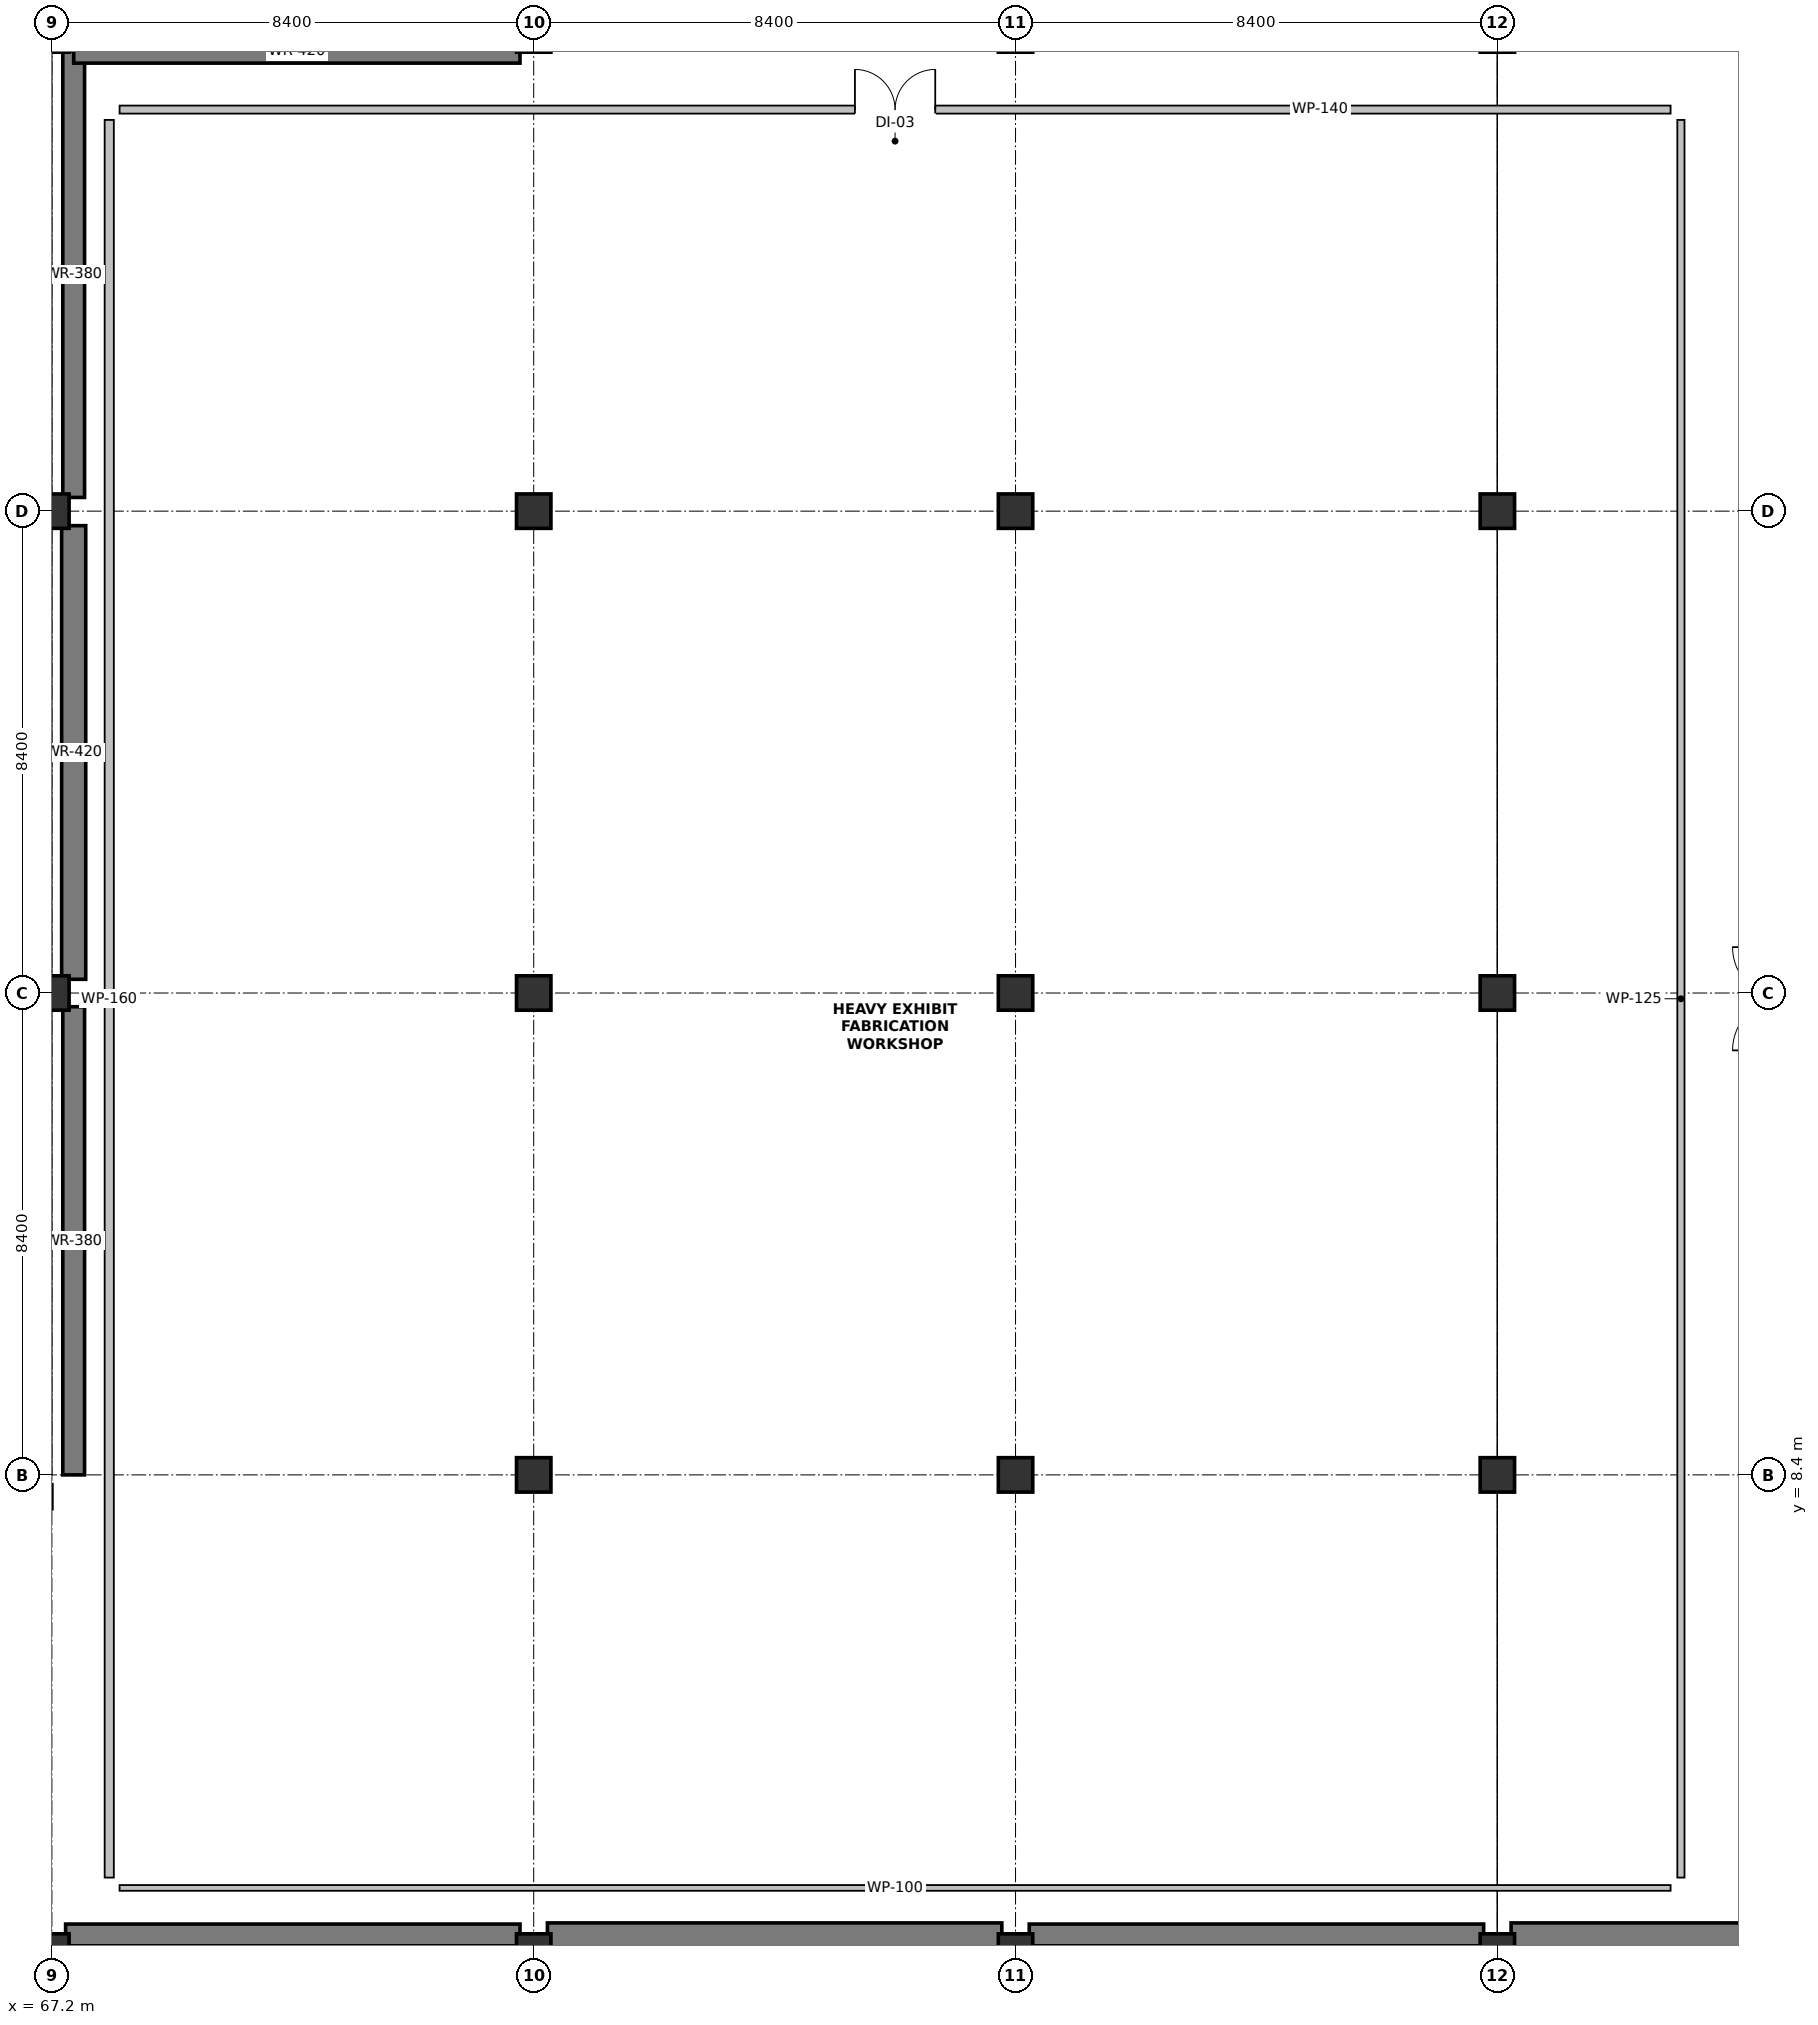
"""IFC4 building model, lengths in metres.
Left out: names, types, materials, properties, quantities, classifications, styles, units other than length and angle.
Written with IfcOpenShell. Run it as: python <this file> out.ifc"""

import sys

from ifc_helpers import new_model, si_unit, direction, frame, frame_2d, origin, origin_2d, place, context, subcontext, project, spatial, rectangle, extrude, element, fill, save


model = new_model("IFC4")
c1 = context("Model", 3, precision=1e-05, world=origin(), true_north=direction((0.0, 1.0)))
c2 = subcontext(c1, "Body", "Model", "MODEL_VIEW")
j1 = project(units=[si_unit("LENGTHUNIT", "METRE"), si_unit("PLANEANGLEUNIT", "RADIAN")], contexts=[c1])
p1 = place(None, origin())
s1 = spatial("IfcSite", under=j1, at=p1, CompositionType="ELEMENT")
p2 = place(p1, origin())
s2 = spatial("IfcBuilding", under=s1, at=p2, CompositionType="ELEMENT")
p3 = place(p2, frame((0.0, 0.0, -4.8)))
s3 = spatial("IfcBuildingStorey", under=s2, at=p3, CompositionType="ELEMENT", Elevation=-4.8)
for number, where, z_axis, x_axis in (
    (1, (67.2, 0.0, 0.0), (0.0, 0.0, 1.0), (1.0, 0.0, 0.0)),
    (2, (75.6, 0.0, 0.0), (0.0, 0.0, 1.0), (1.0, 0.0, 0.0)),
    (3, (84.0, 0.0, 0.0), (0.0, 0.0, 1.0), (1.0, 0.0, 0.0)),
    (4, (92.4, 0.0, 0.0), (0.0, 0.0, 1.0), (1.0, 0.0, 0.0)),
):
    element("IfcColumn", number, at=place(p3, frame(where, z_axis=z_axis, x_axis=x_axis)), inside=s3, PredefinedType="COLUMN", context=c2, shape_type="SweptSolid", body=[
        extrude(rectangle(XDim=0.6, YDim=0.8, at=origin_2d()), origin(), (0.0, 0.0, 1.0), 4.8),
    ])
for number, where, z_axis, x_axis in (
    (5, (67.2, 16.8, 0.0), (0.0, 0.0, 1.0), (1.0, 0.0, 0.0)),
    (6, (67.2, 25.2, 0.0), (0.0, 0.0, 1.0), (1.0, 0.0, 0.0)),
    (7, (75.6, 8.4, 0.0), (0.0, 0.0, 1.0), (1.0, 0.0, 0.0)),
    (8, (75.6, 16.8, 0.0), (0.0, 0.0, 1.0), (1.0, 0.0, 0.0)),
    (9, (75.6, 25.2, 0.0), (0.0, 0.0, 1.0), (1.0, 0.0, 0.0)),
    (10, (84.0, 8.4, 0.0), (0.0, 0.0, 1.0), (1.0, 0.0, 0.0)),
    (11, (84.0, 16.8, 0.0), (0.0, 0.0, 1.0), (1.0, 0.0, 0.0)),
    (12, (84.0, 25.2, 0.0), (0.0, 0.0, 1.0), (1.0, 0.0, 0.0)),
    (13, (92.4, 8.4, 0.0), (0.0, 0.0, 1.0), (1.0, 0.0, 0.0)),
    (14, (92.4, 16.8, 0.0), (0.0, 0.0, 1.0), (1.0, 0.0, 0.0)),
    (15, (92.4, 25.2, 0.0), (0.0, 0.0, 1.0), (1.0, 0.0, 0.0)),
):
    element("IfcColumn", number, at=place(p3, frame(where, z_axis=z_axis, x_axis=x_axis)), inside=s3, PredefinedType="COLUMN", context=c2, shape_type="SweptSolid", body=[
        extrude(rectangle(XDim=0.6, YDim=0.6, at=origin_2d()), origin(), (0.0, 0.0, 1.0), 4.8),
    ])
p4 = place(p3, frame((67.58, 8.4, 0.0), z_axis=(0.0, 0.0, 1.0), x_axis=(0.0, 1.0, 0.0)))
e16 = element("IfcWall", 16, at=p4, inside=s3, PredefinedType="USERDEFINED", context=c2, shape_type="SweptSolid", body=[
    extrude(rectangle(XDim=8.161, YDim=0.38, at=frame_2d((4.081, 0.0))), origin(), (0.0, 0.0, 1.0), 3.85),
])
p5 = place(p3, frame((67.58, 17.039, 0.0), z_axis=(0.0, 0.0, 1.0), x_axis=(0.0, 1.0, 0.0)))
e17 = element("IfcWall", 17, at=p5, inside=s3, PredefinedType="USERDEFINED", context=c2, shape_type="SweptSolid", body=[
    extrude(rectangle(XDim=7.908, YDim=0.42, at=frame_2d((3.954, 0.0))), origin(), (0.0, 0.0, 1.0), 3.75),
])
p6 = place(p3, frame((67.58, 25.439, 0.0), z_axis=(0.0, 0.0, 1.0), x_axis=(0.0, 1.0, 0.0)))
e18 = element("IfcWall", 18, at=p6, inside=s3, PredefinedType="USERDEFINED", context=c2, shape_type="SweptSolid", body=[
    extrude(rectangle(XDim=7.781, YDim=0.38, at=frame_2d((3.89, 0.0))), origin(), (0.0, 0.0, 1.0), 3.85),
])
p7 = place(p3, frame((67.58, 33.22, 0.0), z_axis=(0.0, 0.0, 1.0), x_axis=(1.0, 0.0, 0.0)))
e19 = element("IfcWall", 19, at=p7, inside=s3, PredefinedType="USERDEFINED", context=c2, shape_type="SweptSolid", body=[
    extrude(rectangle(XDim=7.781, YDim=0.42, at=frame_2d((3.89, 0.0))), origin(), (0.0, 0.0, 1.0), 3.85),
])
p8 = place(p3, frame((100.561, 0.38, 0.0), z_axis=(0.0, 0.0, 1.0), x_axis=(-1.0, 0.0, 0.0)))
e20 = element("IfcWall", 20, at=p8, inside=s3, PredefinedType="USERDEFINED", context=c2, shape_type="SweptSolid", body=[
    extrude(rectangle(XDim=7.922, YDim=0.42, at=frame_2d((3.961, 0.0))), origin(), (0.0, 0.0, 1.0), 3.85),
])
p9 = place(p3, frame((92.161, 0.38, 0.0), z_axis=(0.0, 0.0, 1.0), x_axis=(-1.0, 0.0, 0.0)))
e21 = element("IfcWall", 21, at=p9, inside=s3, PredefinedType="USERDEFINED", context=c2, shape_type="SweptSolid", body=[
    extrude(rectangle(XDim=7.922, YDim=0.38, at=frame_2d((3.961, 0.0))), origin(), (0.0, 0.0, 1.0), 3.85),
])
p10 = place(p3, frame((83.761, 0.38, 0.0), z_axis=(0.0, 0.0, 1.0), x_axis=(-1.0, 0.0, 0.0)))
e22 = element("IfcWall", 22, at=p10, inside=s3, PredefinedType="USERDEFINED", context=c2, shape_type="SweptSolid", body=[
    extrude(rectangle(XDim=7.922, YDim=0.42, at=frame_2d((3.961, 0.0))), origin(), (0.0, 0.0, 1.0), 3.85),
])
p11 = place(p3, frame((75.361, 0.38, 0.0), z_axis=(0.0, 0.0, 1.0), x_axis=(-1.0, 0.0, 0.0)))
e23 = element("IfcWall", 23, at=p11, inside=s3, PredefinedType="USERDEFINED", context=c2, shape_type="SweptSolid", body=[
    extrude(rectangle(XDim=7.922, YDim=0.38, at=frame_2d((3.961, 0.0))), origin(), (0.0, 0.0, 1.0), 3.85),
])
p12 = place(p3, frame((59.039, 8.02, 0.0), z_axis=(0.0, 0.0, 1.0), x_axis=(1.0, 0.0, 0.0)))
e24 = element("IfcWall", 24, at=p12, inside=s3, PredefinedType="USERDEFINED", context=c2, shape_type="SweptSolid", body=[
    extrude(rectangle(XDim=8.161, YDim=0.42, at=frame_2d((4.081, 0.0))), origin(), (0.0, 0.0, 1.0), 3.75),
])
p13 = place(p3, frame((68.38, 32.2, 0.0), z_axis=(0.0, 0.0, 1.0), x_axis=(1.0, 0.0, 0.0)))
e25 = element("IfcWall", 25, at=p13, inside=s3, PredefinedType="PARTITIONING", context=c2, shape_type="SweptSolid", body=[
    extrude(rectangle(XDim=27.04, YDim=0.14, at=frame_2d((13.52, 0.0))), origin(), (0.0, 0.0, 1.0), 4.5),
])
p14 = place(p13, frame((12.82, 0.0, 0.0)))
e26 = element("IfcOpeningElement", 26, at=p14, cuts=e25, PredefinedType="OPENING", context=c2, shape_type="SweptSolid", body=[
    extrude(rectangle(XDim=1.4, YDim=2.2, at=frame_2d((0.7, 1.1))), frame((0.0, 0.082, 0.0), z_axis=(0.0, -1.0, 0.0), x_axis=(1.0, 0.0, 0.0)), (0.0, 0.0, 1.0), 0.164),
])
p15 = place(p3, frame((95.6, 32.02, 0.0), z_axis=(0.0, 0.0, 1.0), x_axis=(0.0, -1.0, 0.0)))
e27 = element("IfcWall", 27, at=p15, inside=s3, PredefinedType="PARTITIONING", context=c2, shape_type="SweptSolid", body=[
    extrude(rectangle(XDim=30.64, YDim=0.125, at=frame_2d((15.32, 0.0))), origin(), (0.0, 0.0, 1.0), 4.5),
])
p16 = place(p3, frame((95.42, 1.2, 0.0), z_axis=(0.0, 0.0, 1.0), x_axis=(-1.0, 0.0, 0.0)))
e28 = element("IfcWall", 28, at=p16, inside=s3, PredefinedType="PARTITIONING", context=c2, shape_type="SweptSolid", body=[
    extrude(rectangle(XDim=27.04, YDim=0.1, at=frame_2d((13.52, 0.0))), origin(), (0.0, 0.0, 1.0), 4.5),
])
p17 = place(p3, frame((68.2, 1.38, 0.0), z_axis=(0.0, 0.0, 1.0), x_axis=(0.0, 1.0, 0.0)))
e29 = element("IfcWall", 29, at=p17, inside=s3, PredefinedType="PARTITIONING", context=c2, shape_type="SweptSolid", body=[
    extrude(rectangle(XDim=30.64, YDim=0.16, at=frame_2d((15.32, 0.0))), origin(), (0.0, 0.0, 1.0), 4.5),
])
p18 = place(p14, origin())
e30 = element("IfcDoor", 30, at=p18, inside=s3, OperationType="DOUBLE_DOOR_SINGLE_SWING", PredefinedType="DOOR", context=c2, shape_type="SweptSolid", body=[
    extrude(rectangle(XDim=1.4, YDim=2.2, at=frame_2d((0.7, 1.1))), frame((0.0, 0.025, 0.0), z_axis=(0.0, -1.0, 0.0), x_axis=(1.0, 0.0, 0.0)), (0.0, 0.0, 1.0), 0.05),
])
fill(e26, e30)
save(model, sys.argv[1])
